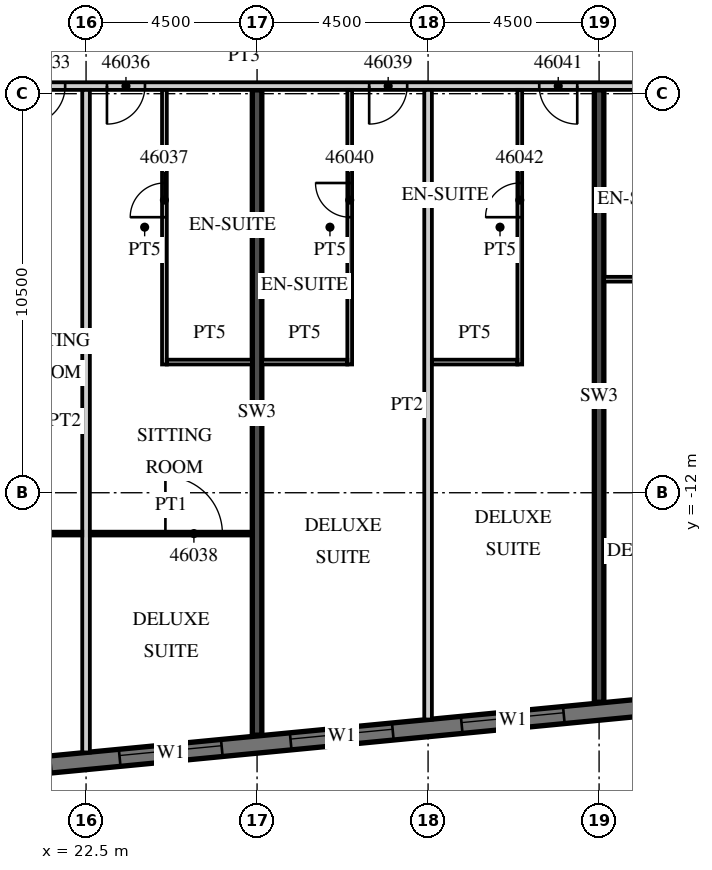
"""IFC4 building model, lengths in metres.
Left out: names, types, materials, properties, quantities, classifications, styles, units other than length and angle.
Written with IfcOpenShell. Run it as: python <this file> out.ifc"""

import sys

from ifc_helpers import new_model, si_unit, direction, frame, frame_2d, origin, place, context, subcontext, project, spatial, rectangle, extrude, element, fill, save


model = new_model("IFC4")
c1 = context("Model", 3, precision=1e-05, world=origin(), true_north=direction((0.0, 1.0)))
c2 = subcontext(c1, "Body", "Model", "MODEL_VIEW")
j1 = project(units=[si_unit("LENGTHUNIT", "METRE"), si_unit("PLANEANGLEUNIT", "RADIAN")], contexts=[c1])
p1 = place(None, origin())
s1 = spatial("IfcSite", under=j1, at=p1, CompositionType="ELEMENT")
p2 = place(p1, origin())
s2 = spatial("IfcBuilding", under=s1, at=p2, CompositionType="ELEMENT")
p3 = place(p2, frame((0.0, 0.0, 193.3)))
s3 = spatial("IfcBuildingStorey", under=s2, at=p3, CompositionType="ELEMENT", Elevation=193.3)
p4 = place(p3, frame((27.0, -18.379, 0.0), z_axis=(0.0, 0.0, 1.0), x_axis=(0.0, 1.0, 0.0)))
e1 = element("IfcWall", 1, at=p4, inside=s3, PredefinedType="SHEAR", context=c2, shape_type="SweptSolid", body=[
    extrude(rectangle(XDim=16.979, YDim=0.25, at=frame_2d((8.489, 0.0))), origin(), (0.0, 0.0, 1.0), 3.3),
])
p5 = place(p3, frame((36.0, -17.512, 0.0), z_axis=(0.0, 0.0, 1.0), x_axis=(0.0, 1.0, 0.0)))
e2 = element("IfcWall", 2, at=p5, inside=s3, PredefinedType="SHEAR", context=c2, shape_type="SweptSolid", body=[
    extrude(rectangle(XDim=16.112, YDim=0.25, at=frame_2d((8.056, 0.0))), origin(), (0.0, 0.0, 1.0), 3.3),
])
p6 = place(p3, frame((-13.521, -22.529, 0.0), z_axis=(0.0, 0.0, 1.0), x_axis=(0.995396436651, 0.095843277819, 0.0)))
e3 = element("IfcWall", 3, at=p6, inside=s3, PredefinedType="SOLIDWALL", context=c2, shape_type="SweptSolid", body=[
    extrude(rectangle(XDim=51.578, YDim=0.45, at=frame_2d((25.789, 0.0))), origin(), (0.0, 0.0, 1.0), 3.02),
])
p7 = place(p6, frame((0.91, 0.0, 0.45)))
e4 = element("IfcOpeningElement", 4, at=p7, cuts=e3, PredefinedType="OPENING", context=c2, shape_type="SweptSolid", body=[
    extrude(rectangle(XDim=2.7, YDim=2.25, at=frame_2d((1.35, 1.125))), frame((0.0, 0.235, 0.0), z_axis=(0.0, -1.0, 0.0), x_axis=(1.0, 0.0, 0.0)), (0.0, 0.0, 1.0), 0.47),
])
p8 = place(p6, frame((5.431, 0.0, 0.45)))
e5 = element("IfcOpeningElement", 5, at=p8, cuts=e3, PredefinedType="OPENING", context=c2, shape_type="SweptSolid", body=[
    extrude(rectangle(XDim=2.7, YDim=2.25, at=frame_2d((1.35, 1.125))), frame((0.0, 0.235, 0.0), z_axis=(0.0, -1.0, 0.0), x_axis=(1.0, 0.0, 0.0)), (0.0, 0.0, 1.0), 0.47),
])
p9 = place(p6, frame((9.952, 0.0, 0.45)))
e6 = element("IfcOpeningElement", 6, at=p9, cuts=e3, PredefinedType="OPENING", context=c2, shape_type="SweptSolid", body=[
    extrude(rectangle(XDim=2.7, YDim=2.25, at=frame_2d((1.35, 1.125))), frame((0.0, 0.235, 0.0), z_axis=(0.0, -1.0, 0.0), x_axis=(1.0, 0.0, 0.0)), (0.0, 0.0, 1.0), 0.47),
])
p10 = place(p6, frame((14.473, 0.0, 0.45)))
e7 = element("IfcOpeningElement", 7, at=p10, cuts=e3, PredefinedType="OPENING", context=c2, shape_type="SweptSolid", body=[
    extrude(rectangle(XDim=2.7, YDim=2.25, at=frame_2d((1.35, 1.125))), frame((0.0, 0.235, 0.0), z_axis=(0.0, -1.0, 0.0), x_axis=(1.0, 0.0, 0.0)), (0.0, 0.0, 1.0), 0.47),
])
p11 = place(p6, frame((18.994, 0.0, 0.45)))
e8 = element("IfcOpeningElement", 8, at=p11, cuts=e3, PredefinedType="OPENING", context=c2, shape_type="SweptSolid", body=[
    extrude(rectangle(XDim=2.7, YDim=2.25, at=frame_2d((1.35, 1.125))), frame((0.0, 0.235, 0.0), z_axis=(0.0, -1.0, 0.0), x_axis=(1.0, 0.0, 0.0)), (0.0, 0.0, 1.0), 0.47),
])
p12 = place(p6, frame((23.514, 0.0, 0.45)))
e9 = element("IfcOpeningElement", 9, at=p12, cuts=e3, PredefinedType="OPENING", context=c2, shape_type="SweptSolid", body=[
    extrude(rectangle(XDim=2.7, YDim=2.25, at=frame_2d((1.35, 1.125))), frame((0.0, 0.235, 0.0), z_axis=(0.0, -1.0, 0.0), x_axis=(1.0, 0.0, 0.0)), (0.0, 0.0, 1.0), 0.47),
])
p13 = place(p6, frame((28.035, 0.0, 0.45)))
e10 = element("IfcOpeningElement", 10, at=p13, cuts=e3, PredefinedType="OPENING", context=c2, shape_type="SweptSolid", body=[
    extrude(rectangle(XDim=2.7, YDim=2.25, at=frame_2d((1.35, 1.125))), frame((0.0, 0.235, 0.0), z_axis=(0.0, -1.0, 0.0), x_axis=(1.0, 0.0, 0.0)), (0.0, 0.0, 1.0), 0.47),
])
p14 = place(p6, frame((32.556, 0.0, 0.45)))
e11 = element("IfcOpeningElement", 11, at=p14, cuts=e3, PredefinedType="OPENING", context=c2, shape_type="SweptSolid", body=[
    extrude(rectangle(XDim=2.7, YDim=2.25, at=frame_2d((1.35, 1.125))), frame((0.0, 0.235, 0.0), z_axis=(0.0, -1.0, 0.0), x_axis=(1.0, 0.0, 0.0)), (0.0, 0.0, 1.0), 0.47),
])
p15 = place(p6, frame((37.077, 0.0, 0.45)))
e12 = element("IfcOpeningElement", 12, at=p15, cuts=e3, PredefinedType="OPENING", context=c2, shape_type="SweptSolid", body=[
    extrude(rectangle(XDim=2.7, YDim=2.25, at=frame_2d((1.35, 1.125))), frame((0.0, 0.235, 0.0), z_axis=(0.0, -1.0, 0.0), x_axis=(1.0, 0.0, 0.0)), (0.0, 0.0, 1.0), 0.47),
])
p16 = place(p6, frame((41.598, 0.0, 0.45)))
e13 = element("IfcOpeningElement", 13, at=p16, cuts=e3, PredefinedType="OPENING", context=c2, shape_type="SweptSolid", body=[
    extrude(rectangle(XDim=2.7, YDim=2.25, at=frame_2d((1.35, 1.125))), frame((0.0, 0.235, 0.0), z_axis=(0.0, -1.0, 0.0), x_axis=(1.0, 0.0, 0.0)), (0.0, 0.0, 1.0), 0.47),
])
p17 = place(p6, frame((46.119, 0.0, 0.45)))
e14 = element("IfcOpeningElement", 14, at=p17, cuts=e3, PredefinedType="OPENING", context=c2, shape_type="SweptSolid", body=[
    extrude(rectangle(XDim=2.7, YDim=2.25, at=frame_2d((1.35, 1.125))), frame((0.0, 0.235, 0.0), z_axis=(0.0, -1.0, 0.0), x_axis=(1.0, 0.0, 0.0)), (0.0, 0.0, 1.0), 0.47),
])
p18 = place(p3, frame((13.5, -1.3, 0.0), z_axis=(0.0, 0.0, 1.0), x_axis=(1.0, 0.0, 0.0)))
e15 = element("IfcWall", 15, at=p18, inside=s3, PredefinedType="PARTITIONING", context=c2, shape_type="SweptSolid", body=[
    extrude(rectangle(XDim=26.317, YDim=0.2, at=frame_2d((13.158, 0.0))), origin(), (0.0, 0.0, 1.0), 3.02),
])
p19 = place(p18, frame((0.575, 0.0, 0.0)))
e16 = element("IfcOpeningElement", 16, at=p19, cuts=e15, PredefinedType="OPENING", context=c2, shape_type="SweptSolid", body=[
    extrude(rectangle(XDim=1.0, YDim=2.1, at=frame_2d((0.5, 1.05))), frame((0.0, 0.11, 0.0), z_axis=(0.0, -1.0, 0.0), x_axis=(1.0, 0.0, 0.0)), (0.0, 0.0, 1.0), 0.22),
])
p20 = place(p18, frame((7.45, 0.0, 0.0)))
e17 = element("IfcOpeningElement", 17, at=p20, cuts=e15, PredefinedType="OPENING", context=c2, shape_type="SweptSolid", body=[
    extrude(rectangle(XDim=1.0, YDim=2.1, at=frame_2d((0.5, 1.05))), frame((0.0, 0.11, 0.0), z_axis=(0.0, -1.0, 0.0), x_axis=(1.0, 0.0, 0.0)), (0.0, 0.0, 1.0), 0.22),
])
p21 = place(p18, frame((9.55, 0.0, 0.0)))
e18 = element("IfcOpeningElement", 18, at=p21, cuts=e15, PredefinedType="OPENING", context=c2, shape_type="SweptSolid", body=[
    extrude(rectangle(XDim=1.0, YDim=2.1, at=frame_2d((0.5, 1.05))), frame((0.0, 0.11, 0.0), z_axis=(0.0, -1.0, 0.0), x_axis=(1.0, 0.0, 0.0)), (0.0, 0.0, 1.0), 0.22),
])
p22 = place(p18, frame((16.45, 0.0, 0.0)))
e19 = element("IfcOpeningElement", 19, at=p22, cuts=e15, PredefinedType="OPENING", context=c2, shape_type="SweptSolid", body=[
    extrude(rectangle(XDim=1.0, YDim=2.1, at=frame_2d((0.5, 1.05))), frame((0.0, 0.11, 0.0), z_axis=(0.0, -1.0, 0.0), x_axis=(1.0, 0.0, 0.0)), (0.0, 0.0, 1.0), 0.22),
])
p23 = place(p18, frame((20.925, 0.0, 0.0)))
e20 = element("IfcOpeningElement", 20, at=p23, cuts=e15, PredefinedType="OPENING", context=c2, shape_type="SweptSolid", body=[
    extrude(rectangle(XDim=1.0, YDim=2.1, at=frame_2d((0.5, 1.05))), frame((0.0, 0.11, 0.0), z_axis=(0.0, -1.0, 0.0), x_axis=(1.0, 0.0, 0.0)), (0.0, 0.0, 1.0), 0.22),
])
p24 = place(p18, frame((25.267, 0.0, 0.0)))
e21 = element("IfcOpeningElement", 21, at=p24, cuts=e15, PredefinedType="OPENING", context=c2, shape_type="SweptSolid", body=[
    extrude(rectangle(XDim=0.9, YDim=2.1, at=frame_2d((0.45, 1.05))), frame((0.0, 0.11, 0.0), z_axis=(0.0, -1.0, 0.0), x_axis=(1.0, 0.0, 0.0)), (0.0, 0.0, 1.0), 0.22),
])
p25 = place(p3, frame((22.5, -18.834, 0.0), z_axis=(0.0, 0.0, 1.0), x_axis=(0.0, 1.0, 0.0)))
e22 = element("IfcWall", 22, at=p25, inside=s3, PredefinedType="PARTITIONING", context=c2, shape_type="SweptSolid", body=[
    extrude(rectangle(XDim=17.434, YDim=0.2, at=frame_2d((8.717, 0.0))), origin(), (0.0, 0.0, 1.0), 3.02),
])
p26 = place(p3, frame((18.125, -13.075, 0.0), z_axis=(0.0, 0.0, 1.0), x_axis=(1.0, 0.0, 0.0)))
e23 = element("IfcWall", 23, at=p26, inside=s3, PredefinedType="PARTITIONING", context=c2, shape_type="SweptSolid", body=[
    extrude(rectangle(XDim=4.275, YDim=0.1, at=frame_2d((2.137, 0.0))), origin(), (0.0, 0.0, 1.0), 3.02),
])
p27 = place(p26, frame((0.787, 0.0, 0.0)))
e24 = element("IfcOpeningElement", 24, at=p27, cuts=e23, PredefinedType="OPENING", context=c2, shape_type="SweptSolid", body=[
    extrude(rectangle(XDim=1.5, YDim=2.1, at=frame_2d((0.75, 1.05))), frame((0.0, 0.06, 0.0), z_axis=(0.0, -1.0, 0.0), x_axis=(1.0, 0.0, 0.0)), (0.0, 0.0, 1.0), 0.12),
])
p28 = place(p3, frame((24.562, -8.625, 0.0), z_axis=(0.0, 0.0, 1.0), x_axis=(0.0, 1.0, 0.0)))
e25 = element("IfcWall", 25, at=p28, inside=s3, PredefinedType="PARTITIONING", context=c2, shape_type="SweptSolid", body=[
    extrude(rectangle(XDim=7.225, YDim=0.125, at=frame_2d((3.613, 0.0))), origin(), (0.0, 0.0, 1.0), 3.02),
])
p29 = place(p28, frame((3.875, 0.0, 0.0)))
e26 = element("IfcOpeningElement", 26, at=p29, cuts=e25, PredefinedType="OPENING", context=c2, shape_type="SweptSolid", body=[
    extrude(rectangle(XDim=0.9, YDim=2.1, at=frame_2d((0.45, 1.05))), frame((0.0, 0.073, 0.0), z_axis=(0.0, -1.0, 0.0), x_axis=(1.0, 0.0, 0.0)), (0.0, 0.0, 1.0), 0.145),
])
p30 = place(p3, frame((24.625, -8.562, 0.0), z_axis=(0.0, 0.0, 1.0), x_axis=(1.0, 0.0, 0.0)))
e27 = element("IfcWall", 27, at=p30, inside=s3, PredefinedType="PARTITIONING", context=c2, shape_type="SweptSolid", body=[
    extrude(rectangle(XDim=2.25, YDim=0.125, at=frame_2d((1.125, 0.0))), origin(), (0.0, 0.0, 1.0), 3.02),
])
p31 = place(p3, frame((22.6, -13.075, 0.0), z_axis=(0.0, 0.0, 1.0), x_axis=(1.0, 0.0, 0.0)))
e28 = element("IfcWall", 28, at=p31, inside=s3, PredefinedType="PARTITIONING", context=c2, shape_type="SweptSolid", body=[
    extrude(rectangle(XDim=4.275, YDim=0.1, at=frame_2d((2.137, 0.0))), origin(), (0.0, 0.0, 1.0), 3.02),
])
p32 = place(p31, frame((1.988, 0.0, 0.0)))
e29 = element("IfcOpeningElement", 29, at=p32, cuts=e28, PredefinedType="OPENING", context=c2, shape_type="SweptSolid", body=[
    extrude(rectangle(XDim=1.5, YDim=2.1, at=frame_2d((0.75, 1.05))), frame((0.0, 0.06, 0.0), z_axis=(0.0, -1.0, 0.0), x_axis=(1.0, 0.0, 0.0)), (0.0, 0.0, 1.0), 0.12),
])
p33 = place(p3, frame((31.5, -17.967, 0.0), z_axis=(0.0, 0.0, 1.0), x_axis=(0.0, 1.0, 0.0)))
e30 = element("IfcWall", 30, at=p33, inside=s3, PredefinedType="PARTITIONING", context=c2, shape_type="SweptSolid", body=[
    extrude(rectangle(XDim=16.567, YDim=0.2, at=frame_2d((8.284, 0.0))), origin(), (0.0, 0.0, 1.0), 3.02),
])
p34 = place(p3, frame((29.438, -8.625, 0.0), z_axis=(0.0, 0.0, 1.0), x_axis=(0.0, 1.0, 0.0)))
e31 = element("IfcWall", 31, at=p34, inside=s3, PredefinedType="PARTITIONING", context=c2, shape_type="SweptSolid", body=[
    extrude(rectangle(XDim=7.225, YDim=0.125, at=frame_2d((3.613, 0.0))), origin(), (0.0, 0.0, 1.0), 3.02),
])
p35 = place(p34, frame((3.875, 0.0, 0.0)))
e32 = element("IfcOpeningElement", 32, at=p35, cuts=e31, PredefinedType="OPENING", context=c2, shape_type="SweptSolid", body=[
    extrude(rectangle(XDim=0.9, YDim=2.1, at=frame_2d((0.45, 1.05))), frame((0.0, 0.073, 0.0), z_axis=(0.0, -1.0, 0.0), x_axis=(1.0, 0.0, 0.0)), (0.0, 0.0, 1.0), 0.145),
])
p36 = place(p3, frame((27.125, -8.562, 0.0), z_axis=(0.0, 0.0, 1.0), x_axis=(1.0, 0.0, 0.0)))
e33 = element("IfcWall", 33, at=p36, inside=s3, PredefinedType="PARTITIONING", context=c2, shape_type="SweptSolid", body=[
    extrude(rectangle(XDim=2.25, YDim=0.125, at=frame_2d((1.125, 0.0))), origin(), (0.0, 0.0, 1.0), 3.02),
])
p37 = place(p3, frame((33.913, -8.625, 0.0), z_axis=(0.0, 0.0, 1.0), x_axis=(0.0, 1.0, 0.0)))
e34 = element("IfcWall", 34, at=p37, inside=s3, PredefinedType="PARTITIONING", context=c2, shape_type="SweptSolid", body=[
    extrude(rectangle(XDim=7.225, YDim=0.125, at=frame_2d((3.613, 0.0))), origin(), (0.0, 0.0, 1.0), 3.02),
])
p38 = place(p37, frame((3.875, 0.0, 0.0)))
e35 = element("IfcOpeningElement", 35, at=p38, cuts=e34, PredefinedType="OPENING", context=c2, shape_type="SweptSolid", body=[
    extrude(rectangle(XDim=0.9, YDim=2.1, at=frame_2d((0.45, 1.05))), frame((0.0, 0.073, 0.0), z_axis=(0.0, -1.0, 0.0), x_axis=(1.0, 0.0, 0.0)), (0.0, 0.0, 1.0), 0.145),
])
p39 = place(p3, frame((31.6, -8.562, 0.0), z_axis=(0.0, 0.0, 1.0), x_axis=(1.0, 0.0, 0.0)))
e36 = element("IfcWall", 36, at=p39, inside=s3, PredefinedType="PARTITIONING", context=c2, shape_type="SweptSolid", body=[
    extrude(rectangle(XDim=2.25, YDim=0.125, at=frame_2d((1.125, 0.0))), origin(), (0.0, 0.0, 1.0), 3.02),
])
p40 = place(p3, frame((36.125, -6.382, 0.0), z_axis=(0.0, 0.0, 1.0), x_axis=(1.0, 0.0, 0.0)))
e37 = element("IfcWall", 37, at=p40, inside=s3, PredefinedType="PARTITIONING", context=c2, shape_type="SweptSolid", body=[
    extrude(rectangle(XDim=2.8, YDim=0.125, at=frame_2d((1.4, 0.0))), origin(), (0.0, 0.0, 1.0), 3.02),
])
p41 = place(p15, origin())
e38 = element("IfcWindow", 38, at=p41, inside=s3, PartitioningType="SINGLE_PANEL", PredefinedType="WINDOW", context=c2, shape_type="SweptSolid", body=[
    extrude(rectangle(XDim=2.7, YDim=2.25, at=frame_2d((1.35, 1.125))), frame((0.0, 0.09, 0.0), z_axis=(0.0, -1.0, 0.0), x_axis=(1.0, 0.0, 0.0)), (0.0, 0.0, 1.0), 0.06),
])
fill(e12, e38)
p42 = place(p16, origin())
e39 = element("IfcWindow", 39, at=p42, inside=s3, PartitioningType="SINGLE_PANEL", PredefinedType="WINDOW", context=c2, shape_type="SweptSolid", body=[
    extrude(rectangle(XDim=2.7, YDim=2.25, at=frame_2d((1.35, 1.125))), frame((0.0, 0.09, 0.0), z_axis=(0.0, -1.0, 0.0), x_axis=(1.0, 0.0, 0.0)), (0.0, 0.0, 1.0), 0.06),
])
fill(e13, e39)
p43 = place(p17, origin())
e40 = element("IfcWindow", 40, at=p43, inside=s3, PartitioningType="SINGLE_PANEL", PredefinedType="WINDOW", context=c2, shape_type="SweptSolid", body=[
    extrude(rectangle(XDim=2.7, YDim=2.25, at=frame_2d((1.35, 1.125))), frame((0.0, 0.09, 0.0), z_axis=(0.0, -1.0, 0.0), x_axis=(1.0, 0.0, 0.0)), (0.0, 0.0, 1.0), 0.06),
])
fill(e14, e40)
p44 = place(p20, origin())
e41 = element("IfcDoor", 41, at=p44, inside=s3, OperationType="SINGLE_SWING_LEFT", PredefinedType="DOOR", context=c2, shape_type="SweptSolid", body=[
    extrude(rectangle(XDim=1.0, YDim=2.1, at=frame_2d((0.5, 1.05))), frame((0.0, 0.025, 0.0), z_axis=(0.0, -1.0, 0.0), x_axis=(1.0, 0.0, 0.0)), (0.0, 0.0, 1.0), 0.05),
])
fill(e17, e41)
p45 = place(p21, origin())
e42 = element("IfcDoor", 42, at=p45, inside=s3, OperationType="SINGLE_SWING_LEFT", PredefinedType="DOOR", context=c2, shape_type="SweptSolid", body=[
    extrude(rectangle(XDim=1.0, YDim=2.1, at=frame_2d((0.5, 1.05))), frame((0.0, 0.025, 0.0), z_axis=(0.0, -1.0, 0.0), x_axis=(1.0, 0.0, 0.0)), (0.0, 0.0, 1.0), 0.05),
])
fill(e18, e42)
p46 = place(p29, origin())
e43 = element("IfcDoor", 43, at=p46, inside=s3, OperationType="SINGLE_SWING_LEFT", PredefinedType="DOOR", context=c2, shape_type="SweptSolid", body=[
    extrude(rectangle(XDim=0.9, YDim=2.1, at=frame_2d((0.45, 1.05))), frame((0.0, 0.025, 0.0), z_axis=(0.0, -1.0, 0.0), x_axis=(1.0, 0.0, 0.0)), (0.0, 0.0, 1.0), 0.05),
])
fill(e26, e43)
p47 = place(p32, origin())
e44 = element("IfcDoor", 44, at=p47, inside=s3, OperationType="SINGLE_SWING_LEFT", PredefinedType="DOOR", context=c2, shape_type="SweptSolid", body=[
    extrude(rectangle(XDim=1.5, YDim=2.1, at=frame_2d((0.75, 1.05))), frame((0.0, 0.025, 0.0), z_axis=(0.0, -1.0, 0.0), x_axis=(1.0, 0.0, 0.0)), (0.0, 0.0, 1.0), 0.05),
])
fill(e29, e44)
p48 = place(p22, origin())
e45 = element("IfcDoor", 45, at=p48, inside=s3, OperationType="SINGLE_SWING_LEFT", PredefinedType="DOOR", context=c2, shape_type="SweptSolid", body=[
    extrude(rectangle(XDim=1.0, YDim=2.1, at=frame_2d((0.5, 1.05))), frame((0.0, 0.025, 0.0), z_axis=(0.0, -1.0, 0.0), x_axis=(1.0, 0.0, 0.0)), (0.0, 0.0, 1.0), 0.05),
])
fill(e19, e45)
p49 = place(p35, origin())
e46 = element("IfcDoor", 46, at=p49, inside=s3, OperationType="SINGLE_SWING_RIGHT", PredefinedType="DOOR", context=c2, shape_type="SweptSolid", body=[
    extrude(rectangle(XDim=0.9, YDim=2.1, at=frame_2d((0.45, 1.05))), frame((0.0, 0.025, 0.0), z_axis=(0.0, -1.0, 0.0), x_axis=(1.0, 0.0, 0.0)), (0.0, 0.0, 1.0), 0.05),
])
fill(e32, e46)
p50 = place(p23, origin())
e47 = element("IfcDoor", 47, at=p50, inside=s3, OperationType="SINGLE_SWING_RIGHT", PredefinedType="DOOR", context=c2, shape_type="SweptSolid", body=[
    extrude(rectangle(XDim=1.0, YDim=2.1, at=frame_2d((0.5, 1.05))), frame((0.0, 0.025, 0.0), z_axis=(0.0, -1.0, 0.0), x_axis=(1.0, 0.0, 0.0)), (0.0, 0.0, 1.0), 0.05),
])
fill(e20, e47)
p51 = place(p38, origin())
e48 = element("IfcDoor", 48, at=p51, inside=s3, OperationType="SINGLE_SWING_LEFT", PredefinedType="DOOR", context=c2, shape_type="SweptSolid", body=[
    extrude(rectangle(XDim=0.9, YDim=2.1, at=frame_2d((0.45, 1.05))), frame((0.0, 0.025, 0.0), z_axis=(0.0, -1.0, 0.0), x_axis=(1.0, 0.0, 0.0)), (0.0, 0.0, 1.0), 0.05),
])
fill(e35, e48)
save(model, sys.argv[1])
